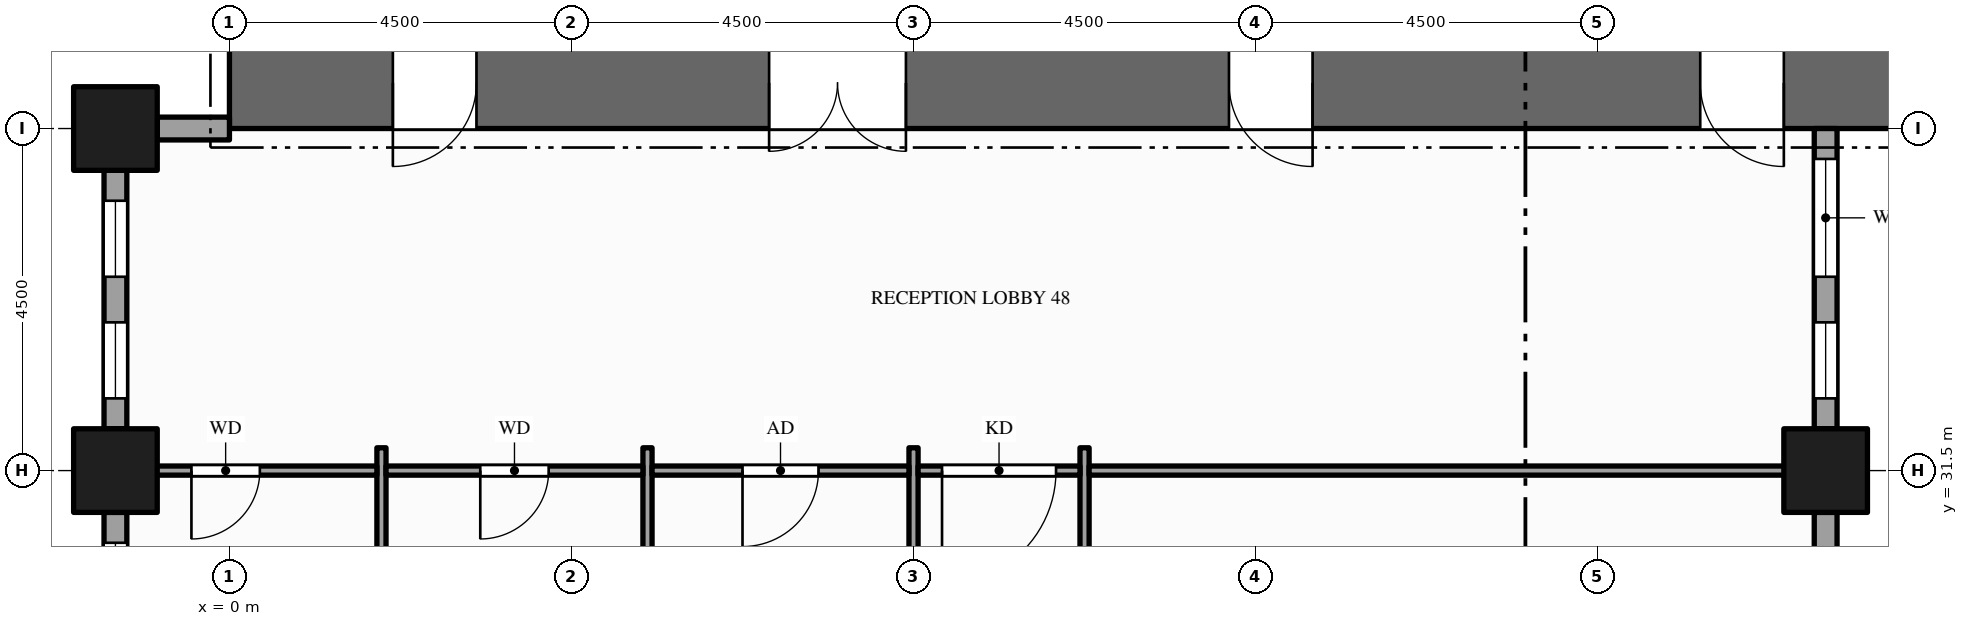
"""IFC4 building model, lengths in metres.
Left out: names, types, materials, properties, quantities, classifications, styles, units other than length and angle.
Written with IfcOpenShell. Run it as: python <this file> out.ifc"""

import sys

from ifc_helpers import new_model, si_unit, direction, frame, frame_2d, origin, origin_2d, place, context, subcontext, project, spatial, rectangle, hollow_rectangle, extrude, element, fill, save


model = new_model("IFC4")
c1 = context("Model", 3, precision=1e-05, world=origin(), true_north=direction((0.0, 1.0)))
c2 = subcontext(c1, "Body", "Model", "MODEL_VIEW")
j1 = project(units=[si_unit("LENGTHUNIT", "METRE"), si_unit("PLANEANGLEUNIT", "RADIAN")], contexts=[c1])
p1 = place(None, origin())
s1 = spatial("IfcSite", under=j1, at=p1, CompositionType="ELEMENT")
p2 = place(p1, origin())
s2 = spatial("IfcBuilding", under=s1, at=p2, CompositionType="ELEMENT")
p3 = place(p2, frame((0.0, 0.0, 33.0)))
s3 = spatial("IfcBuildingStorey", under=s2, at=p3, CompositionType="ELEMENT", Elevation=33.0)
p4 = place(p3, frame((0.0, 36.6, -0.15), z_axis=(0.0, 0.0, 1.0), x_axis=(1.0, 0.0, 0.0)))
e1 = element("IfcWall", 1, at=p4, inside=s3, PredefinedType="SHEAR", context=c2, shape_type="SweptSolid", body=[
    extrude(rectangle(XDim=22.5, YDim=1.2, at=frame_2d((11.25, 0.0))), origin(), (0.0, 0.0, 1.0), 4.0),
])
p5 = place(p4, frame((7.1, 0.0, 0.15)))
e2 = element("IfcOpeningElement", 2, at=p5, cuts=e1, PredefinedType="OPENING", context=c2, shape_type="SweptSolid", body=[
    extrude(rectangle(XDim=1.8, YDim=2.1, at=frame_2d((0.9, 1.05))), frame((0.0, 0.61, 0.0), z_axis=(0.0, -1.0, 0.0), x_axis=(1.0, 0.0, 0.0)), (0.0, 0.0, 1.0), 1.22),
])
p6 = place(p4, frame((13.15, 0.0, 0.15)))
e3 = element("IfcOpeningElement", 3, at=p6, cuts=e1, PredefinedType="OPENING", context=c2, shape_type="SweptSolid", body=[
    extrude(rectangle(XDim=1.1, YDim=2.1, at=frame_2d((0.55, 1.05))), frame((0.0, 0.61, 0.0), z_axis=(0.0, -1.0, 0.0), x_axis=(1.0, 0.0, 0.0)), (0.0, 0.0, 1.0), 1.22),
])
p7 = place(p4, frame((2.15, 0.0, 0.15)))
e4 = element("IfcOpeningElement", 4, at=p7, cuts=e1, PredefinedType="OPENING", context=c2, shape_type="SweptSolid", body=[
    extrude(rectangle(XDim=1.1, YDim=2.1, at=frame_2d((0.55, 1.05))), frame((0.0, 0.61, 0.0), z_axis=(0.0, -1.0, 0.0), x_axis=(1.0, 0.0, 0.0)), (0.0, 0.0, 1.0), 1.22),
])
p8 = place(p4, frame((19.35, 0.0, 0.15)))
e5 = element("IfcOpeningElement", 5, at=p8, cuts=e1, PredefinedType="OPENING", context=c2, shape_type="SweptSolid", body=[
    extrude(rectangle(XDim=1.1, YDim=2.1, at=frame_2d((0.55, 1.05))), frame((0.0, 0.61, 0.0), z_axis=(0.0, -1.0, 0.0), x_axis=(1.0, 0.0, 0.0)), (0.0, 0.0, 1.0), 1.22),
])
for number, where, z_axis, x_axis in (
    (6, (-1.5, 31.5, -0.15), (0.0, 0.0, 1.0), (1.0, 0.0, 0.0)),
    (7, (-1.5, 36.0, -0.15), (0.0, 0.0, 1.0), (1.0, 0.0, 0.0)),
    (8, (21.0, 31.5, -0.15), (0.0, 0.0, 1.0), (1.0, 0.0, 0.0)),
):
    element("IfcColumn", number, at=place(p3, frame(where, z_axis=z_axis, x_axis=x_axis)), inside=s3, PredefinedType="COLUMN", context=c2, shape_type="SweptSolid", body=[
        extrude(hollow_rectangle(XDim=1.1, YDim=1.1, WallThickness=0.06, at=origin_2d()), origin(), (0.0, 0.0, 1.0), 4.0),
    ])
p9 = place(p3, frame((21.0, 29.05, 0.0), z_axis=(0.0, 0.0, 1.0), x_axis=(0.0, 1.0, 0.0)))
e9 = element("IfcWall", 9, at=p9, inside=s3, PredefinedType="STANDARD", context=c2, shape_type="SweptSolid", body=[
    extrude(rectangle(XDim=1.9, YDim=0.3, at=frame_2d((0.95, 0.0))), origin(), (0.0, 0.0, 1.0), 3.144),
])
p10 = place(p3, frame((21.0, 32.05, 0.0), z_axis=(0.0, 0.0, 1.0), x_axis=(0.0, 1.0, 0.0)))
e10 = element("IfcWall", 10, at=p10, inside=s3, PredefinedType="STANDARD", context=c2, shape_type="SweptSolid", body=[
    extrude(rectangle(XDim=3.95, YDim=0.3, at=frame_2d((1.975, 0.0))), origin(), (0.0, 0.0, 1.0), 3.144),
])
p11 = place(p10, frame((0.4, 0.0, 0.9)))
e11 = element("IfcOpeningElement", 11, at=p11, cuts=e10, PredefinedType="OPENING", context=c2, shape_type="SweptSolid", body=[
    extrude(rectangle(XDim=1.0, YDim=2.0, at=frame_2d((0.5, 1.0))), frame((0.0, 0.16, 0.0), z_axis=(0.0, -1.0, 0.0), x_axis=(1.0, 0.0, 0.0)), (0.0, 0.0, 1.0), 0.32),
])
p12 = place(p10, frame((2.0, 0.0, 0.9)))
e12 = element("IfcOpeningElement", 12, at=p12, cuts=e10, PredefinedType="OPENING", context=c2, shape_type="SweptSolid", body=[
    extrude(rectangle(XDim=1.55, YDim=2.0, at=frame_2d((0.775, 1.0))), frame((0.0, 0.16, 0.0), z_axis=(0.0, -1.0, 0.0), x_axis=(1.0, 0.0, 0.0)), (0.0, 0.0, 1.0), 0.32),
])
p13 = place(p3, frame((0.0, 36.0, 0.0), z_axis=(0.0, 0.0, 1.0), x_axis=(-1.0, 0.0, 0.0)))
e13 = element("IfcWall", 13, at=p13, inside=s3, PredefinedType="STANDARD", context=c2, shape_type="SweptSolid", body=[
    extrude(rectangle(XDim=0.95, YDim=0.3, at=frame_2d((0.475, 0.0))), origin(), (0.0, 0.0, 1.0), 2.938),
])
p14 = place(p3, frame((-1.5, 35.45, 0.0), z_axis=(0.0, 0.0, 1.0), x_axis=(0.0, -1.0, 0.0)))
e14 = element("IfcWall", 14, at=p14, inside=s3, PredefinedType="STANDARD", context=c2, shape_type="SweptSolid", body=[
    extrude(rectangle(XDim=3.4, YDim=0.3, at=frame_2d((1.7, 0.0))), origin(), (0.0, 0.0, 1.0), 3.144),
])
p15 = place(p14, frame((0.4, 0.0, 0.9)))
e15 = element("IfcOpeningElement", 15, at=p15, cuts=e14, PredefinedType="OPENING", context=c2, shape_type="SweptSolid", body=[
    extrude(rectangle(XDim=1.0, YDim=2.0, at=frame_2d((0.5, 1.0))), frame((0.0, 0.16, 0.0), z_axis=(0.0, -1.0, 0.0), x_axis=(1.0, 0.0, 0.0)), (0.0, 0.0, 1.0), 0.32),
])
p16 = place(p14, frame((2.0, 0.0, 0.9)))
e16 = element("IfcOpeningElement", 16, at=p16, cuts=e14, PredefinedType="OPENING", context=c2, shape_type="SweptSolid", body=[
    extrude(rectangle(XDim=1.0, YDim=2.0, at=frame_2d((0.5, 1.0))), frame((0.0, 0.16, 0.0), z_axis=(0.0, -1.0, 0.0), x_axis=(1.0, 0.0, 0.0)), (0.0, 0.0, 1.0), 0.32),
])
p17 = place(p3, frame((-1.5, 30.95, 0.0), z_axis=(0.0, 0.0, 1.0), x_axis=(0.0, -1.0, 0.0)))
e17 = element("IfcWall", 17, at=p17, inside=s3, PredefinedType="STANDARD", context=c2, shape_type="SweptSolid", body=[
    extrude(rectangle(XDim=3.4, YDim=0.3, at=frame_2d((1.7, 0.0))), origin(), (0.0, 0.0, 1.0), 3.144),
])
p18 = place(p17, frame((0.4, 0.0, 0.9)))
e18 = element("IfcOpeningElement", 18, at=p18, cuts=e17, PredefinedType="OPENING", context=c2, shape_type="SweptSolid", body=[
    extrude(rectangle(XDim=1.0, YDim=2.0, at=frame_2d((0.5, 1.0))), frame((0.0, 0.16, 0.0), z_axis=(0.0, -1.0, 0.0), x_axis=(1.0, 0.0, 0.0)), (0.0, 0.0, 1.0), 0.32),
])
p19 = place(p17, frame((2.0, 0.0, 0.9)))
e19 = element("IfcOpeningElement", 19, at=p19, cuts=e17, PredefinedType="OPENING", context=c2, shape_type="SweptSolid", body=[
    extrude(rectangle(XDim=1.0, YDim=2.0, at=frame_2d((0.5, 1.0))), frame((0.0, 0.16, 0.0), z_axis=(0.0, -1.0, 0.0), x_axis=(1.0, 0.0, 0.0)), (0.0, 0.0, 1.0), 0.32),
])
for number, where, z_axis, x_axis in (
    (20, (2.0, 26.7, 0.0), (0.0, 0.0, 1.0), (0.0, 1.0, 0.0)),
    (21, (5.5, 26.7, 0.0), (0.0, 0.0, 1.0), (0.0, 1.0, 0.0)),
):
    element("IfcWall", number, at=place(p3, frame(where, z_axis=z_axis, x_axis=x_axis)), inside=s3, PredefinedType="PARTITIONING", context=c2, shape_type="SweptSolid", body=[
        extrude(rectangle(XDim=5.1, YDim=0.12, at=frame_2d((2.55, 0.0))), origin(), (0.0, 0.0, 1.0), 3.85),
    ])
p20 = place(p3, frame((9.0, 10.95, 0.0), z_axis=(0.0, 0.0, 1.0), x_axis=(0.0, 1.0, 0.0)))
e22 = element("IfcWall", 22, at=p20, inside=s3, PredefinedType="PARTITIONING", context=c2, shape_type="SweptSolid", body=[
    extrude(rectangle(XDim=20.85, YDim=0.12, at=frame_2d((10.425, 0.0))), origin(), (0.0, 0.0, 1.0), 2.6),
])
p21 = place(p20, frame((2.05, 0.0, 0.0)))
e23 = element("IfcOpeningElement", 23, at=p21, cuts=e22, PredefinedType="OPENING", context=c2, shape_type="SweptSolid", body=[
    extrude(rectangle(XDim=1.0, YDim=2.1, at=frame_2d((0.5, 1.05))), frame((0.0, 0.07, 0.0), z_axis=(0.0, -1.0, 0.0), x_axis=(1.0, 0.0, 0.0)), (0.0, 0.0, 1.0), 0.14),
])
p22 = place(p20, frame((6.6, 0.0, 0.0)))
e24 = element("IfcOpeningElement", 24, at=p22, cuts=e22, PredefinedType="OPENING", context=c2, shape_type="SweptSolid", body=[
    extrude(rectangle(XDim=0.9, YDim=2.1, at=frame_2d((0.45, 1.05))), frame((0.0, 0.07, 0.0), z_axis=(0.0, -1.0, 0.0), x_axis=(1.0, 0.0, 0.0)), (0.0, 0.0, 1.0), 0.14),
])
p23 = place(p20, frame((11.805, 0.0, 0.0)))
e25 = element("IfcOpeningElement", 25, at=p23, cuts=e22, PredefinedType="OPENING", context=c2, shape_type="SweptSolid", body=[
    extrude(rectangle(XDim=1.8, YDim=2.1, at=frame_2d((0.9, 1.05))), frame((0.0, 0.07, 0.0), z_axis=(0.0, -1.0, 0.0), x_axis=(1.0, 0.0, 0.0)), (0.0, 0.0, 1.0), 0.14),
])
p24 = place(p3, frame((11.25, 10.95, 0.0), z_axis=(0.0, 0.0, 1.0), x_axis=(0.0, 1.0, 0.0)))
e26 = element("IfcWall", 26, at=p24, inside=s3, PredefinedType="PARTITIONING", context=c2, shape_type="SweptSolid", body=[
    extrude(rectangle(XDim=20.85, YDim=0.12, at=frame_2d((10.425, 0.0))), origin(), (0.0, 0.0, 1.0), 2.6),
])
p25 = place(p24, frame((17.85, 0.0, 0.0)))
e27 = element("IfcOpeningElement", 27, at=p25, cuts=e26, PredefinedType="OPENING", context=c2, shape_type="SweptSolid", body=[
    extrude(rectangle(XDim=0.9, YDim=2.1, at=frame_2d((0.45, 1.05))), frame((0.0, 0.07, 0.0), z_axis=(0.0, -1.0, 0.0), x_axis=(1.0, 0.0, 0.0)), (0.0, 0.0, 1.0), 0.14),
])
p26 = place(p24, frame((4.2, 0.0, 0.0)))
e28 = element("IfcOpeningElement", 28, at=p26, cuts=e26, PredefinedType="OPENING", context=c2, shape_type="SweptSolid", body=[
    extrude(rectangle(XDim=1.2, YDim=2.1, at=frame_2d((0.6, 1.05))), frame((0.0, 0.07, 0.0), z_axis=(0.0, -1.0, 0.0), x_axis=(1.0, 0.0, 0.0)), (0.0, 0.0, 1.0), 0.14),
])
p27 = place(p3, frame((-1.35, 31.5, 0.0), z_axis=(0.0, 0.0, 1.0), x_axis=(1.0, 0.0, 0.0)))
e29 = element("IfcWall", 29, at=p27, inside=s3, PredefinedType="PARTITIONING", context=c2, shape_type="SweptSolid", body=[
    extrude(rectangle(XDim=3.29, YDim=0.12, at=frame_2d((1.645, 0.0))), origin(), (0.0, 0.0, 1.0), 2.938),
])
p28 = place(p27, frame((0.85, 0.0, 0.0)))
e30 = element("IfcOpeningElement", 30, at=p28, cuts=e29, PredefinedType="OPENING", context=c2, shape_type="SweptSolid", body=[
    extrude(rectangle(XDim=0.9, YDim=2.1, at=frame_2d((0.45, 1.05))), frame((0.0, 0.07, 0.0), z_axis=(0.0, -1.0, 0.0), x_axis=(1.0, 0.0, 0.0)), (0.0, 0.0, 1.0), 0.14),
])
p29 = place(p3, frame((2.06, 31.5, 0.0), z_axis=(0.0, 0.0, 1.0), x_axis=(1.0, 0.0, 0.0)))
e31 = element("IfcWall", 31, at=p29, inside=s3, PredefinedType="PARTITIONING", context=c2, shape_type="SweptSolid", body=[
    extrude(rectangle(XDim=3.38, YDim=0.12, at=frame_2d((1.69, 0.0))), origin(), (0.0, 0.0, 1.0), 2.938),
])
p30 = place(p29, frame((1.24, 0.0, 0.0)))
e32 = element("IfcOpeningElement", 32, at=p30, cuts=e31, PredefinedType="OPENING", context=c2, shape_type="SweptSolid", body=[
    extrude(rectangle(XDim=0.9, YDim=2.1, at=frame_2d((0.45, 1.05))), frame((0.0, 0.07, 0.0), z_axis=(0.0, -1.0, 0.0), x_axis=(1.0, 0.0, 0.0)), (0.0, 0.0, 1.0), 0.14),
])
p31 = place(p3, frame((5.56, 31.5, 0.0), z_axis=(0.0, 0.0, 1.0), x_axis=(1.0, 0.0, 0.0)))
e33 = element("IfcWall", 33, at=p31, inside=s3, PredefinedType="PARTITIONING", context=c2, shape_type="SweptSolid", body=[
    extrude(rectangle(XDim=3.38, YDim=0.12, at=frame_2d((1.69, 0.0))), origin(), (0.0, 0.0, 1.0), 2.938),
])
p32 = place(p31, frame((1.19, 0.0, 0.0)))
e34 = element("IfcOpeningElement", 34, at=p32, cuts=e33, PredefinedType="OPENING", context=c2, shape_type="SweptSolid", body=[
    extrude(rectangle(XDim=1.0, YDim=2.1, at=frame_2d((0.5, 1.05))), frame((0.0, 0.07, 0.0), z_axis=(0.0, -1.0, 0.0), x_axis=(1.0, 0.0, 0.0)), (0.0, 0.0, 1.0), 0.14),
])
p33 = place(p3, frame((9.06, 31.5, 0.0), z_axis=(0.0, 0.0, 1.0), x_axis=(1.0, 0.0, 0.0)))
e35 = element("IfcWall", 35, at=p33, inside=s3, PredefinedType="PARTITIONING", context=c2, shape_type="SweptSolid", body=[
    extrude(rectangle(XDim=2.13, YDim=0.12, at=frame_2d((1.065, 0.0))), origin(), (0.0, 0.0, 1.0), 2.938),
])
p34 = place(p33, frame((0.315, 0.0, 0.0)))
e36 = element("IfcOpeningElement", 36, at=p34, cuts=e35, PredefinedType="OPENING", context=c2, shape_type="SweptSolid", body=[
    extrude(rectangle(XDim=1.5, YDim=2.1, at=frame_2d((0.75, 1.05))), frame((0.0, 0.07, 0.0), z_axis=(0.0, -1.0, 0.0), x_axis=(1.0, 0.0, 0.0)), (0.0, 0.0, 1.0), 0.14),
])
p35 = place(p3, frame((11.31, 31.5, 0.0), z_axis=(0.0, 0.0, 1.0), x_axis=(1.0, 0.0, 0.0)))
e37 = element("IfcWall", 37, at=p35, inside=s3, PredefinedType="PARTITIONING", context=c2, shape_type="SweptSolid", body=[
    extrude(rectangle(XDim=9.54, YDim=0.12, at=frame_2d((4.77, 0.0))), origin(), (0.0, 0.0, 1.0), 2.938),
])
p36 = place(p11, origin())
e38 = element("IfcWindow", 38, at=p36, inside=s3, PartitioningType="SINGLE_PANEL", PredefinedType="WINDOW", context=c2, shape_type="SweptSolid", body=[
    extrude(rectangle(XDim=1.0, YDim=2.0, at=frame_2d((0.5, 1.0))), frame((0.0, 0.03, 0.0), z_axis=(0.0, -1.0, 0.0), x_axis=(1.0, 0.0, 0.0)), (0.0, 0.0, 1.0), 0.06),
])
fill(e11, e38)
p37 = place(p12, origin())
e39 = element("IfcWindow", 39, at=p37, inside=s3, PartitioningType="SINGLE_PANEL", PredefinedType="WINDOW", context=c2, shape_type="SweptSolid", body=[
    extrude(rectangle(XDim=1.55, YDim=2.0, at=frame_2d((0.775, 1.0))), frame((0.0, 0.03, 0.0), z_axis=(0.0, -1.0, 0.0), x_axis=(1.0, 0.0, 0.0)), (0.0, 0.0, 1.0), 0.06),
])
fill(e12, e39)
p38 = place(p15, origin())
e40 = element("IfcWindow", 40, at=p38, inside=s3, PartitioningType="SINGLE_PANEL", PredefinedType="WINDOW", context=c2, shape_type="SweptSolid", body=[
    extrude(rectangle(XDim=1.0, YDim=2.0, at=frame_2d((0.5, 1.0))), frame((0.0, 0.03, 0.0), z_axis=(0.0, -1.0, 0.0), x_axis=(1.0, 0.0, 0.0)), (0.0, 0.0, 1.0), 0.06),
])
fill(e15, e40)
p39 = place(p16, origin())
e41 = element("IfcWindow", 41, at=p39, inside=s3, PartitioningType="SINGLE_PANEL", PredefinedType="WINDOW", context=c2, shape_type="SweptSolid", body=[
    extrude(rectangle(XDim=1.0, YDim=2.0, at=frame_2d((0.5, 1.0))), frame((0.0, 0.03, 0.0), z_axis=(0.0, -1.0, 0.0), x_axis=(1.0, 0.0, 0.0)), (0.0, 0.0, 1.0), 0.06),
])
fill(e16, e41)
p40 = place(p18, origin())
e42 = element("IfcWindow", 42, at=p40, inside=s3, PartitioningType="SINGLE_PANEL", PredefinedType="WINDOW", context=c2, shape_type="SweptSolid", body=[
    extrude(rectangle(XDim=1.0, YDim=2.0, at=frame_2d((0.5, 1.0))), frame((0.0, 0.03, 0.0), z_axis=(0.0, -1.0, 0.0), x_axis=(1.0, 0.0, 0.0)), (0.0, 0.0, 1.0), 0.06),
])
fill(e18, e42)
p41 = place(p5, origin())
e43 = element("IfcDoor", 43, at=p41, inside=s3, OperationType="DOUBLE_DOOR_SINGLE_SWING", PredefinedType="DOOR", context=c2, shape_type="SweptSolid", body=[
    extrude(rectangle(XDim=1.8, YDim=2.1, at=frame_2d((0.9, 1.05))), frame((0.0, 0.025, 0.0), z_axis=(0.0, -1.0, 0.0), x_axis=(1.0, 0.0, 0.0)), (0.0, 0.0, 1.0), 0.05),
])
fill(e2, e43)
p42 = place(p6, origin())
e44 = element("IfcDoor", 44, at=p42, inside=s3, OperationType="SINGLE_SWING_RIGHT", PredefinedType="DOOR", context=c2, shape_type="SweptSolid", body=[
    extrude(rectangle(XDim=1.1, YDim=2.1, at=frame_2d((0.55, 1.05))), frame((0.0, 0.025, 0.0), z_axis=(0.0, -1.0, 0.0), x_axis=(1.0, 0.0, 0.0)), (0.0, 0.0, 1.0), 0.05),
])
fill(e3, e44)
p43 = place(p7, origin())
e45 = element("IfcDoor", 45, at=p43, inside=s3, OperationType="SINGLE_SWING_LEFT", PredefinedType="DOOR", context=c2, shape_type="SweptSolid", body=[
    extrude(rectangle(XDim=1.1, YDim=2.1, at=frame_2d((0.55, 1.05))), frame((0.0, 0.025, 0.0), z_axis=(0.0, -1.0, 0.0), x_axis=(1.0, 0.0, 0.0)), (0.0, 0.0, 1.0), 0.05),
])
fill(e4, e45)
p44 = place(p8, origin())
e46 = element("IfcDoor", 46, at=p44, inside=s3, OperationType="SINGLE_SWING_RIGHT", PredefinedType="DOOR", context=c2, shape_type="SweptSolid", body=[
    extrude(rectangle(XDim=1.1, YDim=2.1, at=frame_2d((0.55, 1.05))), frame((0.0, 0.025, 0.0), z_axis=(0.0, -1.0, 0.0), x_axis=(1.0, 0.0, 0.0)), (0.0, 0.0, 1.0), 0.05),
])
fill(e5, e46)
p45 = place(p34, origin())
e47 = element("IfcDoor", 47, at=p45, inside=s3, OperationType="SINGLE_SWING_LEFT", PredefinedType="DOOR", context=c2, shape_type="SweptSolid", body=[
    extrude(rectangle(XDim=1.5, YDim=2.1, at=frame_2d((0.75, 1.05))), frame((0.0, 0.025, 0.0), z_axis=(0.0, -1.0, 0.0), x_axis=(1.0, 0.0, 0.0)), (0.0, 0.0, 1.0), 0.05),
])
fill(e36, e47)
p46 = place(p28, origin())
e48 = element("IfcDoor", 48, at=p46, inside=s3, OperationType="SINGLE_SWING_LEFT", PredefinedType="DOOR", context=c2, shape_type="SweptSolid", body=[
    extrude(rectangle(XDim=0.9, YDim=2.1, at=frame_2d((0.45, 1.05))), frame((0.0, 0.025, 0.0), z_axis=(0.0, -1.0, 0.0), x_axis=(1.0, 0.0, 0.0)), (0.0, 0.0, 1.0), 0.05),
])
fill(e30, e48)
p47 = place(p30, origin())
e49 = element("IfcDoor", 49, at=p47, inside=s3, OperationType="SINGLE_SWING_LEFT", PredefinedType="DOOR", context=c2, shape_type="SweptSolid", body=[
    extrude(rectangle(XDim=0.9, YDim=2.1, at=frame_2d((0.45, 1.05))), frame((0.0, 0.025, 0.0), z_axis=(0.0, -1.0, 0.0), x_axis=(1.0, 0.0, 0.0)), (0.0, 0.0, 1.0), 0.05),
])
fill(e32, e49)
p48 = place(p32, origin())
e50 = element("IfcDoor", 50, at=p48, inside=s3, OperationType="SINGLE_SWING_LEFT", PredefinedType="DOOR", context=c2, shape_type="SweptSolid", body=[
    extrude(rectangle(XDim=1.0, YDim=2.1, at=frame_2d((0.5, 1.05))), frame((0.0, 0.025, 0.0), z_axis=(0.0, -1.0, 0.0), x_axis=(1.0, 0.0, 0.0)), (0.0, 0.0, 1.0), 0.05),
])
fill(e34, e50)
save(model, sys.argv[1])
